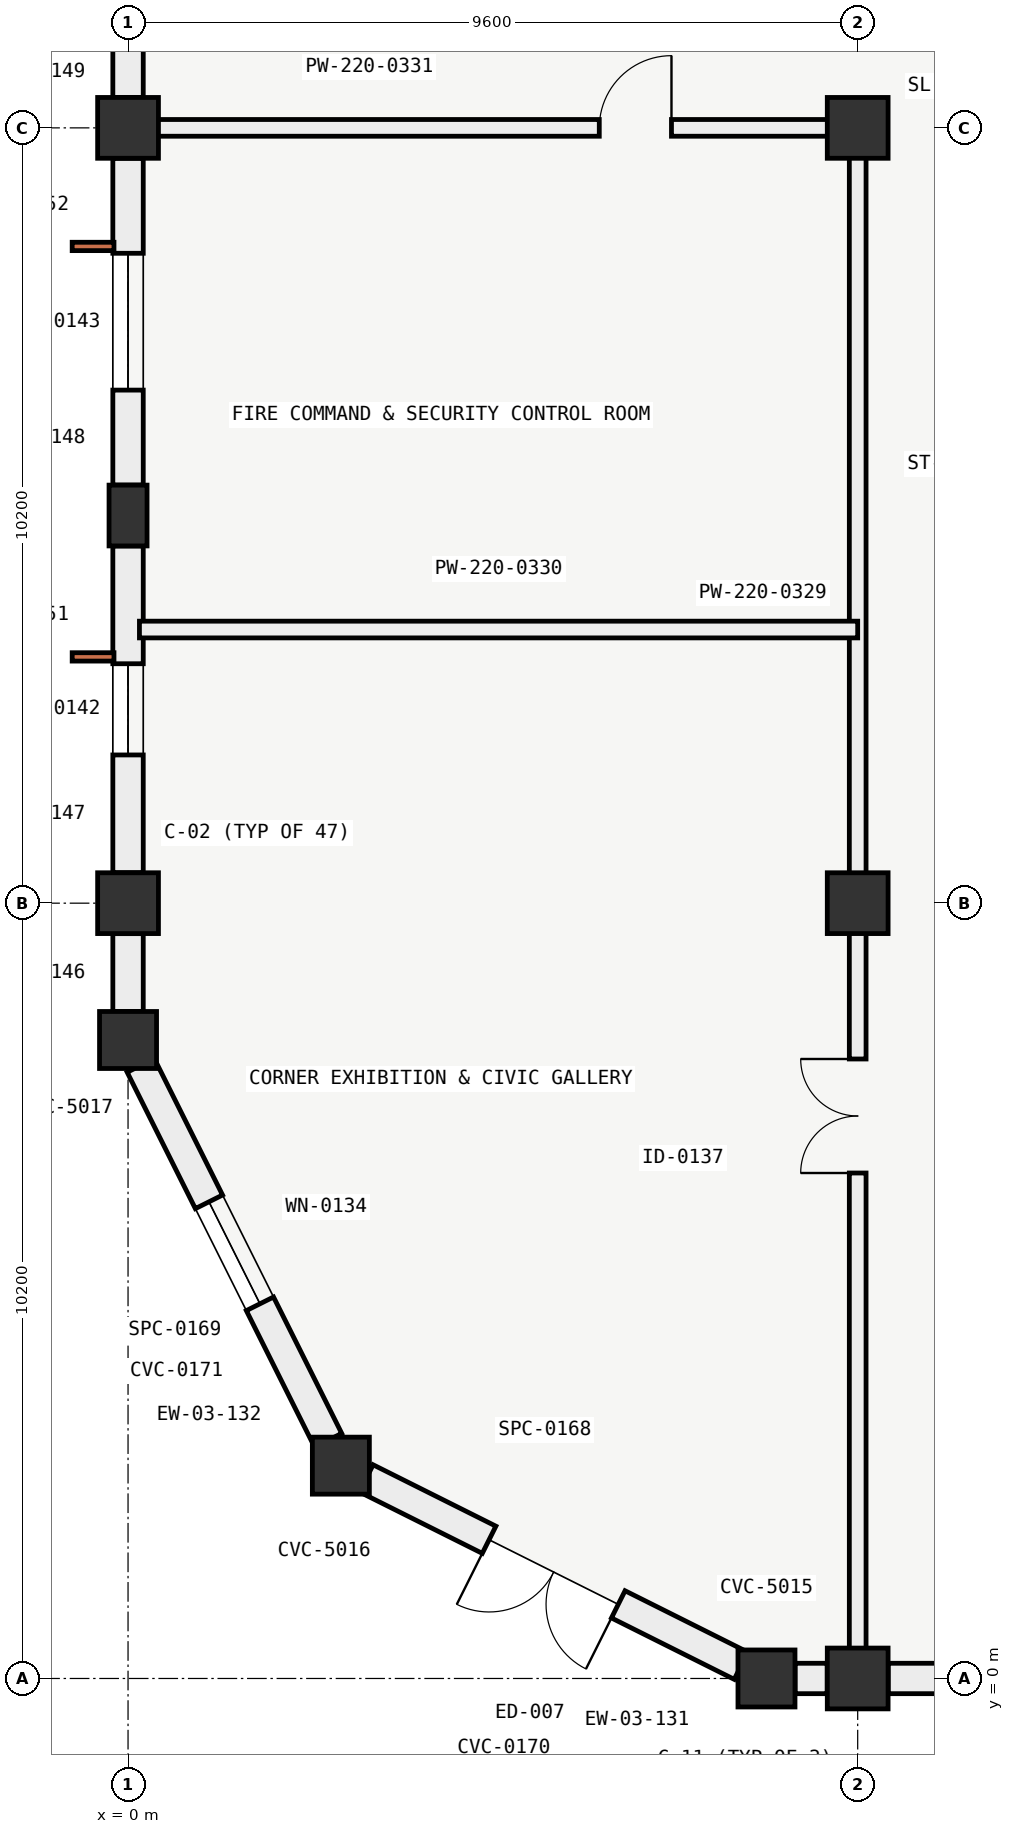
"""IFC4 building model, lengths in metres.
Left out: names, types, materials, properties, quantities, classifications, styles, units other than length and angle.
Written with IfcOpenShell. Run it as: python <this file> out.ifc"""

import sys

from ifc_helpers import new_model, si_unit, direction, frame, frame_2d, origin, origin_2d, place, context, subcontext, project, spatial, rectangle, circle, extrude, element, fill, save


model = new_model("IFC4")
c1 = context("Model", 3, precision=1e-05, world=origin(), true_north=direction((0.0, 1.0)))
c2 = subcontext(c1, "Body", "Model", "MODEL_VIEW")
j1 = project(units=[si_unit("LENGTHUNIT", "METRE"), si_unit("PLANEANGLEUNIT", "RADIAN")], contexts=[c1])
p1 = place(None, origin())
s1 = spatial("IfcSite", under=j1, at=p1, CompositionType="ELEMENT")
p2 = place(p1, origin())
s2 = spatial("IfcBuilding", under=s1, at=p2, CompositionType="ELEMENT")
p3 = place(p2, origin())
s3 = spatial("IfcBuildingStorey", under=s2, at=p3, CompositionType="ELEMENT", Elevation=0.0)
for number, where, z_axis, x_axis in (
    (1, (0.0, 10.2, 0.0), (0.0, 0.0, 1.0), (1.0, 0.0, 0.0)),
    (2, (0.0, 20.4, 0.0), (0.0, 0.0, 1.0), (1.0, 0.0, 0.0)),
    (3, (9.6, 0.0, 0.0), (0.0, 0.0, 1.0), (1.0, 0.0, 0.0)),
    (4, (9.6, 10.2, 0.0), (0.0, 0.0, 1.0), (1.0, 0.0, 0.0)),
    (5, (9.6, 20.4, 0.0), (0.0, 0.0, 1.0), (1.0, 0.0, 0.0)),
):
    element("IfcColumn", number, at=place(p3, frame(where, z_axis=z_axis, x_axis=x_axis)), inside=s3, PredefinedType="COLUMN", context=c2, shape_type="SweptSolid", body=[
        extrude(rectangle(XDim=0.8, YDim=0.8, at=origin_2d()), origin(), (0.0, 0.0, 1.0), 5.4),
    ])
for number, where, z_axis, x_axis in (
    (6, (8.4, 0.0, 0.0), (0.0, 0.0, 1.0), (0.0, 1.0, 0.0)),
    (7, (2.8, 2.8, 0.0), (0.0, 0.0, 1.0), (0.707, 0.707, 0.0)),
    (8, (0.0, 8.4, 0.0), (0.0, 0.0, 1.0), (1.0, 0.0, 0.0)),
):
    element("IfcColumn", number, at=place(p3, frame(where, z_axis=z_axis, x_axis=x_axis)), inside=s3, PredefinedType="COLUMN", context=c2, shape_type="SweptSolid", body=[
        extrude(circle(Radius=0.375, at=origin_2d()), origin(), (0.0, 0.0, 1.0), 5.4),
    ])
p4 = place(p3, frame((0.0, 15.3, 0.0), z_axis=(0.0, 0.0, 1.0), x_axis=(1.0, 0.0, 0.0)))
e9 = element("IfcColumn", 9, at=p4, inside=s3, PredefinedType="PILASTER", context=c2, shape_type="SweptSolid", body=[
    extrude(rectangle(XDim=0.5, YDim=0.8, at=origin_2d()), origin(), (0.0, 0.0, 1.0), 5.4),
])
p5 = place(p3, frame((8.065, 0.167, 0.0), z_axis=(0.0, 0.0, 1.0), x_axis=(-0.89443604882, 0.447195879422, 0.0)))
e10 = element("IfcWall", 10, at=p5, inside=s3, PredefinedType="SOLIDWALL", context=c2, shape_type="SweptSolid", body=[
    extrude(rectangle(XDim=5.512, YDim=0.4, at=frame_2d((2.756, 0.0))), origin(), (0.0, 0.0, 1.0), 4.4),
])
p6 = place(p5, frame((1.806, 0.0, 0.0)))
e11 = element("IfcOpeningElement", 11, at=p6, cuts=e10, PredefinedType="OPENING", context=c2, shape_type="SweptSolid", body=[
    extrude(rectangle(XDim=1.9, YDim=2.35, at=frame_2d((0.95, 1.175))), frame((0.0, 0.21, 0.0), z_axis=(0.0, -1.0, 0.0), x_axis=(1.0, 0.0, 0.0)), (0.0, 0.0, 1.0), 0.42),
])
p7 = place(p3, frame((2.633, 3.135, 0.0), z_axis=(0.0, 0.0, 1.0), x_axis=(-0.447195879422, 0.89443604882, 0.0)))
e12 = element("IfcWall", 12, at=p7, inside=s3, PredefinedType="SOLIDWALL", context=c2, shape_type="SweptSolid", body=[
    extrude(rectangle(XDim=5.512, YDim=0.4, at=frame_2d((2.756, 0.0))), origin(), (0.0, 0.0, 1.0), 4.4),
])
p8 = place(p7, frame((2.006, 0.0, 0.7)))
e13 = element("IfcOpeningElement", 13, at=p8, cuts=e12, PredefinedType="OPENING", context=c2, shape_type="SweptSolid", body=[
    extrude(rectangle(XDim=1.5, YDim=2.6, at=frame_2d((0.75, 1.3))), frame((0.0, 0.21, 0.0), z_axis=(0.0, -1.0, 0.0), x_axis=(1.0, 0.0, 0.0)), (0.0, 0.0, 1.0), 0.42),
])
p9 = place(p3, frame((9.199, 0.0, 0.0), z_axis=(0.0, 0.0, 1.0), x_axis=(-1.0, 0.0, 0.0)))
e14 = element("IfcWall", 14, at=p9, inside=s3, PredefinedType="SOLIDWALL", context=c2, shape_type="SweptSolid", body=[
    extrude(rectangle(XDim=0.423, YDim=0.4, at=frame_2d((0.211, 0.0))), origin(), (0.0, 0.0, 1.0), 4.45),
])
p10 = place(p3, frame((13.275, 0.0, 0.0), z_axis=(0.0, 0.0, 1.0), x_axis=(-1.0, 0.0, 0.0)))
e15 = element("IfcWall", 15, at=p10, inside=s3, PredefinedType="SOLIDWALL", context=c2, shape_type="SweptSolid", body=[
    extrude(rectangle(XDim=3.274, YDim=0.4, at=frame_2d((1.637, 0.0))), origin(), (0.0, 0.0, 1.0), 3.58),
])
p11 = place(p10, frame((0.637, 0.0, 0.0)))
e16 = element("IfcOpeningElement", 16, at=p11, cuts=e15, PredefinedType="OPENING", context=c2, shape_type="SweptSolid", body=[
    extrude(rectangle(XDim=2.0, YDim=2.4, at=frame_2d((1.0, 1.2))), frame((0.0, 0.21, 0.0), z_axis=(0.0, -1.0, 0.0), x_axis=(1.0, 0.0, 0.0)), (0.0, 0.0, 1.0), 0.42),
])
p12 = place(p3, frame((0.0, 8.776, 0.0), z_axis=(0.0, 0.0, 1.0), x_axis=(0.0, 1.0, 0.0)))
e17 = element("IfcWall", 17, at=p12, inside=s3, PredefinedType="SOLIDWALL", context=c2, shape_type="SweptSolid", body=[
    extrude(rectangle(XDim=1.023, YDim=0.4, at=frame_2d((0.512, 0.0))), origin(), (0.0, 0.0, 1.0), 4.45),
])
p13 = place(p3, frame((0.0, 10.601, 0.0), z_axis=(0.0, 0.0, 1.0), x_axis=(0.0, 1.0, 0.0)))
e18 = element("IfcWall", 18, at=p13, inside=s3, PredefinedType="SOLIDWALL", context=c2, shape_type="SweptSolid", body=[
    extrude(rectangle(XDim=4.298, YDim=0.4, at=frame_2d((2.149, 0.0))), origin(), (0.0, 0.0, 1.0), 4.45),
])
p14 = place(p13, frame((1.549, 0.0, 0.85)))
e19 = element("IfcOpeningElement", 19, at=p14, cuts=e18, PredefinedType="OPENING", context=c2, shape_type="SweptSolid", body=[
    extrude(rectangle(XDim=1.2, YDim=1.8, at=frame_2d((0.6, 0.9))), frame((0.0, 0.21, 0.0), z_axis=(0.0, -1.0, 0.0), x_axis=(1.0, 0.0, 0.0)), (0.0, 0.0, 1.0), 0.42),
])
p15 = place(p3, frame((0.0, 15.701, 0.0), z_axis=(0.0, 0.0, 1.0), x_axis=(0.0, 1.0, 0.0)))
e20 = element("IfcWall", 20, at=p15, inside=s3, PredefinedType="SOLIDWALL", context=c2, shape_type="SweptSolid", body=[
    extrude(rectangle(XDim=4.298, YDim=0.4, at=frame_2d((2.149, 0.0))), origin(), (0.0, 0.0, 1.0), 4.45),
])
p16 = place(p15, frame((1.249, 0.0, 0.85)))
e21 = element("IfcOpeningElement", 21, at=p16, cuts=e20, PredefinedType="OPENING", context=c2, shape_type="SweptSolid", body=[
    extrude(rectangle(XDim=1.8, YDim=2.1, at=frame_2d((0.9, 1.05))), frame((0.0, 0.21, 0.0), z_axis=(0.0, -1.0, 0.0), x_axis=(1.0, 0.0, 0.0)), (0.0, 0.0, 1.0), 0.42),
])
p17 = place(p3, frame((0.0, 20.801, 0.0), z_axis=(0.0, 0.0, 1.0), x_axis=(0.0, 1.0, 0.0)))
e22 = element("IfcWall", 22, at=p17, inside=s3, PredefinedType="SOLIDWALL", context=c2, shape_type="SweptSolid", body=[
    extrude(rectangle(XDim=3.149, YDim=0.4, at=frame_2d((1.574, 0.0))), origin(), (0.0, 0.0, 1.0), 4.45),
])
p18 = place(p17, frame((1.024, 0.0, 0.0)))
e23 = element("IfcOpeningElement", 23, at=p18, cuts=e22, PredefinedType="OPENING", context=c2, shape_type="SweptSolid", body=[
    extrude(rectangle(XDim=1.1, YDim=2.2, at=frame_2d((0.55, 1.1))), frame((0.0, 0.21, 0.0), z_axis=(0.0, -1.0, 0.0), x_axis=(1.0, 0.0, 0.0)), (0.0, 0.0, 1.0), 0.42),
])
p19 = place(p3, frame((9.6, 0.15, 0.0), z_axis=(0.0, 0.0, 1.0), x_axis=(0.0, 1.0, 0.0)))
e24 = element("IfcWall", 24, at=p19, inside=s3, PredefinedType="PARTITIONING", context=c2, shape_type="SweptSolid", body=[
    extrude(rectangle(XDim=20.25, YDim=0.22, at=frame_2d((10.125, 0.0))), origin(), (0.0, 0.0, 1.0), 4.4),
])
p20 = place(p19, frame((6.5, 0.0, 0.0)))
e25 = element("IfcOpeningElement", 25, at=p20, cuts=e24, PredefinedType="OPENING", context=c2, shape_type="SweptSolid", body=[
    extrude(rectangle(XDim=1.5, YDim=2.2, at=frame_2d((0.75, 1.1))), frame((0.0, 0.12, 0.0), z_axis=(0.0, -1.0, 0.0), x_axis=(1.0, 0.0, 0.0)), (0.0, 0.0, 1.0), 0.24),
])
p21 = place(p3, frame((0.15, 13.8, 0.0), z_axis=(0.0, 0.0, 1.0), x_axis=(1.0, 0.0, 0.0)))
e26 = element("IfcWall", 26, at=p21, inside=s3, PredefinedType="PARTITIONING", context=c2, shape_type="SweptSolid", body=[
    extrude(rectangle(XDim=9.45, YDim=0.22, at=frame_2d((4.725, 0.0))), origin(), (0.0, 0.0, 1.0), 4.45),
])
p22 = place(p3, frame((0.15, 20.4, 0.0), z_axis=(0.0, 0.0, 1.0), x_axis=(1.0, 0.0, 0.0)))
e27 = element("IfcWall", 27, at=p22, inside=s3, PredefinedType="PARTITIONING", context=c2, shape_type="SweptSolid", body=[
    extrude(rectangle(XDim=9.45, YDim=0.22, at=frame_2d((4.725, 0.0))), origin(), (0.0, 0.0, 1.0), 4.4),
])
p23 = place(p22, frame((6.05, 0.0, 0.0)))
e28 = element("IfcOpeningElement", 28, at=p23, cuts=e27, PredefinedType="OPENING", context=c2, shape_type="SweptSolid", body=[
    extrude(rectangle(XDim=0.95, YDim=2.1, at=frame_2d((0.475, 1.05))), frame((0.0, 0.12, 0.0), z_axis=(0.0, -1.0, 0.0), x_axis=(1.0, 0.0, 0.0)), (0.0, 0.0, 1.0), 0.24),
])
p24 = place(p6, origin())
e29 = element("IfcDoor", 29, at=p24, inside=s3, OperationType="DOUBLE_DOOR_SINGLE_SWING", PredefinedType="DOOR", context=c2, shape_type="SweptSolid", body=[
    extrude(rectangle(XDim=1.9, YDim=2.35, at=frame_2d((0.95, 1.175))), frame((0.0, 0.025, 0.0), z_axis=(0.0, -1.0, 0.0), x_axis=(1.0, 0.0, 0.0)), (0.0, 0.0, 1.0), 0.05),
])
fill(e11, e29)
p25 = place(p8, origin())
e30 = element("IfcWindow", 30, at=p25, inside=s3, PartitioningType="SINGLE_PANEL", PredefinedType="WINDOW", context=c2, shape_type="SweptSolid", body=[
    extrude(rectangle(XDim=1.5, YDim=2.6, at=frame_2d((0.75, 1.3))), frame((0.0, 0.03, 0.0), z_axis=(0.0, -1.0, 0.0), x_axis=(1.0, 0.0, 0.0)), (0.0, 0.0, 1.0), 0.06),
])
fill(e13, e30)
p26 = place(p14, origin())
e31 = element("IfcWindow", 31, at=p26, inside=s3, PartitioningType="SINGLE_PANEL", PredefinedType="WINDOW", context=c2, shape_type="SweptSolid", body=[
    extrude(rectangle(XDim=1.2, YDim=1.8, at=frame_2d((0.6, 0.9))), frame((0.0, 0.03, 0.0), z_axis=(0.0, -1.0, 0.0), x_axis=(1.0, 0.0, 0.0)), (0.0, 0.0, 1.0), 0.06),
])
fill(e19, e31)
p27 = place(p16, origin())
e32 = element("IfcWindow", 32, at=p27, inside=s3, PartitioningType="SINGLE_PANEL", PredefinedType="WINDOW", context=c2, shape_type="SweptSolid", body=[
    extrude(rectangle(XDim=1.8, YDim=2.1, at=frame_2d((0.9, 1.05))), frame((0.0, 0.03, 0.0), z_axis=(0.0, -1.0, 0.0), x_axis=(1.0, 0.0, 0.0)), (0.0, 0.0, 1.0), 0.06),
])
fill(e21, e32)
p28 = place(p20, origin())
e33 = element("IfcDoor", 33, at=p28, inside=s3, OperationType="DOUBLE_DOOR_SINGLE_SWING", PredefinedType="DOOR", context=c2, shape_type="SweptSolid", body=[
    extrude(rectangle(XDim=1.5, YDim=2.2, at=frame_2d((0.75, 1.1))), frame((0.0, 0.025, 0.0), z_axis=(0.0, -1.0, 0.0), x_axis=(1.0, 0.0, 0.0)), (0.0, 0.0, 1.0), 0.05),
])
fill(e25, e33)
p29 = place(p23, origin())
e34 = element("IfcDoor", 34, at=p29, inside=s3, OperationType="SINGLE_SWING_RIGHT", PredefinedType="DOOR", context=c2, shape_type="SweptSolid", body=[
    extrude(rectangle(XDim=0.95, YDim=2.1, at=frame_2d((0.475, 1.05))), frame((0.0, 0.025, 0.0), z_axis=(0.0, -1.0, 0.0), x_axis=(1.0, 0.0, 0.0)), (0.0, 0.0, 1.0), 0.05),
])
fill(e28, e34)
save(model, sys.argv[1])
